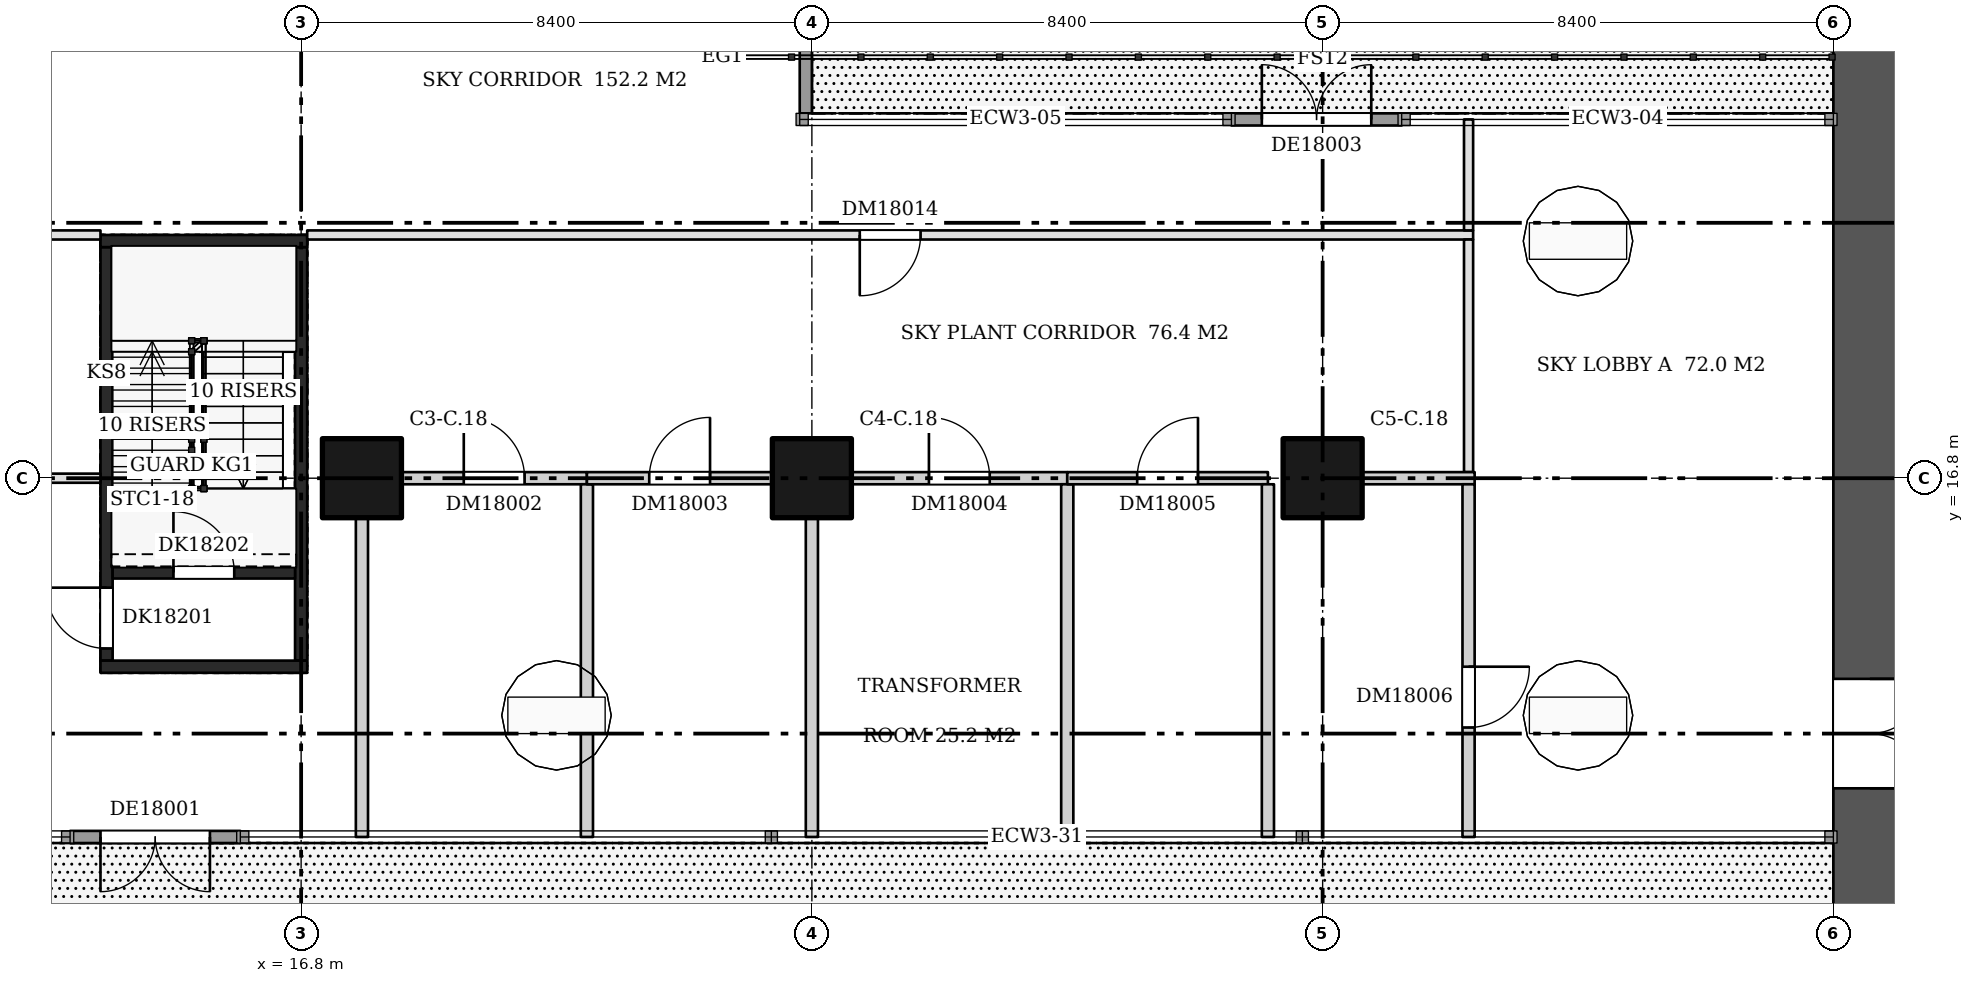
"""IFC4 building model, lengths in metres.
Left out: names, types, materials, properties, quantities, classifications, styles, units other than length and angle.
Written with IfcOpenShell. Run it as: python <this file> out.ifc"""

import sys

from ifc_helpers import new_model, si_unit, direction, frame, frame_2d, origin, origin_2d, place, context, subcontext, project, spatial, rectangle, extrude, element, fill, save


model = new_model("IFC4")
c1 = context("Model", 3, precision=1e-05, world=origin(), true_north=direction((0.0, 1.0)))
c2 = subcontext(c1, "Body", "Model", "MODEL_VIEW")
j1 = project(units=[si_unit("LENGTHUNIT", "METRE"), si_unit("PLANEANGLEUNIT", "RADIAN")], contexts=[c1])
p1 = place(None, origin())
s1 = spatial("IfcSite", under=j1, at=p1, CompositionType="ELEMENT")
p2 = place(p1, origin())
s2 = spatial("IfcBuilding", under=s1, at=p2, CompositionType="ELEMENT")
p3 = place(p2, frame((0.0, 0.0, 74.2)))
s3 = spatial("IfcBuildingStorey", under=s2, at=p3, CompositionType="ELEMENT", Elevation=74.2)
for number, where, z_axis, x_axis in (
    (1, (17.8, 16.8, 0.0), (0.0, 0.0, 1.0), (1.0, 0.0, 0.0)),
    (2, (25.2, 16.8, 0.0), (0.0, 0.0, 1.0), (1.0, 0.0, 0.0)),
    (3, (33.6, 16.8, 0.0), (0.0, 0.0, 1.0), (1.0, 0.0, 0.0)),
):
    element("IfcColumn", number, at=place(p3, frame(where, z_axis=z_axis, x_axis=x_axis)), inside=s3, PredefinedType="COLUMN", context=c2, shape_type="SweptSolid", body=[
        extrude(rectangle(XDim=1.3, YDim=1.3, at=origin_2d()), origin(), (0.0, 0.0, 1.0), 6.72),
    ])
p4 = place(p3, frame((42.6, 9.6, 0.0), z_axis=(0.0, 0.0, 1.0), x_axis=(0.0, 1.0, 0.0)))
e4 = element("IfcWall", 4, at=p4, inside=s3, PredefinedType="SHEAR", context=c2, shape_type="SweptSolid", body=[
    extrude(rectangle(XDim=14.4, YDim=1.2, at=frame_2d((7.2, 0.0))), origin(), (0.0, 0.0, 1.0), 6.72),
])
p5 = place(p4, frame((2.1, 0.0, 0.0)))
e5 = element("IfcOpeningElement", 5, at=p5, cuts=e4, PredefinedType="OPENING", context=c2, shape_type="SweptSolid", body=[
    extrude(rectangle(XDim=1.8, YDim=2.1, at=frame_2d((0.9, 1.05))), frame((0.0, 0.61, 0.0), z_axis=(0.0, -1.0, 0.0), x_axis=(1.0, 0.0, 0.0)), (0.0, 0.0, 1.0), 1.22),
])
p6 = place(p3, frame((13.6, 13.8, 0.0), z_axis=(0.0, 0.0, 1.0), x_axis=(0.0, 1.0, 0.0)))
e6 = element("IfcWall", 6, at=p6, inside=s3, PredefinedType="SHEAR", context=c2, shape_type="SweptSolid", body=[
    extrude(rectangle(XDim=6.8, YDim=0.2, at=frame_2d((3.4, 0.0))), origin(), (0.0, 0.0, 1.0), 6.72),
])
p7 = place(p6, frame((0.2, 0.0, 0.0)))
e7 = element("IfcOpeningElement", 7, at=p7, cuts=e6, PredefinedType="OPENING", context=c2, shape_type="SweptSolid", body=[
    extrude(rectangle(XDim=1.0, YDim=2.1, at=frame_2d((0.5, 1.05))), frame((0.0, 0.11, 0.0), z_axis=(0.0, -1.0, 0.0), x_axis=(1.0, 0.0, 0.0)), (0.0, 0.0, 1.0), 0.22),
])
p8 = place(p3, frame((16.8, 13.8, 0.0), z_axis=(0.0, 0.0, 1.0), x_axis=(0.0, 1.0, 0.0)))
e8 = element("IfcWall", 8, at=p8, inside=s3, PredefinedType="SHEAR", context=c2, shape_type="SweptSolid", body=[
    extrude(rectangle(XDim=6.8, YDim=0.2, at=frame_2d((3.4, 0.0))), origin(), (0.0, 0.0, 1.0), 6.72),
])
for number, where, z_axis, x_axis in (
    (9, (13.5, 13.7, 0.0), (0.0, 0.0, 1.0), (1.0, 0.0, 0.0)),
    (10, (13.5, 20.7, 0.0), (0.0, 0.0, 1.0), (1.0, 0.0, 0.0)),
):
    element("IfcWall", number, at=place(p3, frame(where, z_axis=z_axis, x_axis=x_axis)), inside=s3, PredefinedType="SHEAR", context=c2, shape_type="SweptSolid", body=[
        extrude(rectangle(XDim=3.4, YDim=0.2, at=frame_2d((1.7, 0.0))), origin(), (0.0, 0.0, 1.0), 6.72),
    ])
p9 = place(p3, frame((13.7, 15.25, 0.0), z_axis=(0.0, 0.0, 1.0), x_axis=(1.0, 0.0, 0.0)))
e11 = element("IfcWall", 11, at=p9, inside=s3, PredefinedType="SHEAR", context=c2, shape_type="SweptSolid", body=[
    extrude(rectangle(XDim=3.0, YDim=0.2, at=frame_2d((1.5, 0.0))), origin(), (0.0, 0.0, 1.0), 6.72),
])
p10 = place(p9, frame((1.0, 0.0, 0.0)))
e12 = element("IfcOpeningElement", 12, at=p10, cuts=e11, PredefinedType="OPENING", context=c2, shape_type="SweptSolid", body=[
    extrude(rectangle(XDim=1.0, YDim=2.1, at=frame_2d((0.5, 1.05))), frame((0.0, 0.11, 0.0), z_axis=(0.0, -1.0, 0.0), x_axis=(1.0, 0.0, 0.0)), (0.0, 0.0, 1.0), 0.22),
])
p11 = place(p3, frame((9.05, 16.8, 0.0), z_axis=(0.0, 0.0, 1.0), x_axis=(1.0, 0.0, 0.0)))
e13 = element("IfcWall", 13, at=p11, inside=s3, PredefinedType="PARTITIONING", context=c2, shape_type="SweptSolid", body=[
    extrude(rectangle(XDim=4.45, YDim=0.15, at=frame_2d((2.225, 0.0))), origin(), (0.0, 0.0, 1.0), 6.72),
])
p12 = place(p3, frame((2.5, 20.8, 0.0), z_axis=(0.0, 0.0, 1.0), x_axis=(1.0, 0.0, 0.0)))
e14 = element("IfcWall", 14, at=p12, inside=s3, PredefinedType="PARTITIONING", context=c2, shape_type="SweptSolid", body=[
    extrude(rectangle(XDim=11.0, YDim=0.15, at=frame_2d((5.5, 0.0))), origin(), (0.0, 0.0, 1.0), 6.72),
])
p13 = place(p12, frame((5.0, 0.0, 0.0)))
e15 = element("IfcOpeningElement", 15, at=p13, cuts=e14, PredefinedType="OPENING", context=c2, shape_type="SweptSolid", body=[
    extrude(rectangle(XDim=1.0, YDim=2.1, at=frame_2d((0.5, 1.05))), frame((0.0, 0.085, 0.0), z_axis=(0.0, -1.0, 0.0), x_axis=(1.0, 0.0, 0.0)), (0.0, 0.0, 1.0), 0.17),
])
p14 = place(p3, frame((16.9, 20.8, 0.0), z_axis=(0.0, 0.0, 1.0), x_axis=(1.0, 0.0, 0.0)))
e16 = element("IfcWall", 16, at=p14, inside=s3, PredefinedType="PARTITIONING", context=c2, shape_type="SweptSolid", body=[
    extrude(rectangle(XDim=19.175, YDim=0.15, at=frame_2d((9.587, 0.0))), origin(), (0.0, 0.0, 1.0), 6.72),
])
p15 = place(p14, frame((9.087, 0.0, 0.0)))
e17 = element("IfcOpeningElement", 17, at=p15, cuts=e16, PredefinedType="OPENING", context=c2, shape_type="SweptSolid", body=[
    extrude(rectangle(XDim=1.0, YDim=2.1, at=frame_2d((0.5, 1.05))), frame((0.0, 0.085, 0.0), z_axis=(0.0, -1.0, 0.0), x_axis=(1.0, 0.0, 0.0)), (0.0, 0.0, 1.0), 0.17),
])
p16 = place(p3, frame((17.8, 10.9, 0.0), z_axis=(0.0, 0.0, 1.0), x_axis=(0.0, 1.0, 0.0)))
e18 = element("IfcWall", 18, at=p16, inside=s3, PredefinedType="PARTITIONING", context=c2, shape_type="SweptSolid", body=[
    extrude(rectangle(XDim=5.25, YDim=0.2, at=frame_2d((2.625, 0.0))), origin(), (0.0, 0.0, 1.0), 6.72),
])
p17 = place(p3, frame((18.45, 16.8, 0.0), z_axis=(0.0, 0.0, 1.0), x_axis=(1.0, 0.0, 0.0)))
e19 = element("IfcWall", 19, at=p17, inside=s3, PredefinedType="PARTITIONING", context=c2, shape_type="SweptSolid", body=[
    extrude(rectangle(XDim=3.05, YDim=0.2, at=frame_2d((1.525, 0.0))), origin(), (0.0, 0.0, 1.0), 6.72),
])
p18 = place(p17, frame((1.025, 0.0, 0.0)))
e20 = element("IfcOpeningElement", 20, at=p18, cuts=e19, PredefinedType="OPENING", context=c2, shape_type="SweptSolid", body=[
    extrude(rectangle(XDim=1.0, YDim=2.1, at=frame_2d((0.5, 1.05))), frame((0.0, 0.11, 0.0), z_axis=(0.0, -1.0, 0.0), x_axis=(1.0, 0.0, 0.0)), (0.0, 0.0, 1.0), 0.22),
])
p19 = place(p3, frame((21.5, 10.9, 0.0), z_axis=(0.0, 0.0, 1.0), x_axis=(0.0, 1.0, 0.0)))
e21 = element("IfcWall", 21, at=p19, inside=s3, PredefinedType="PARTITIONING", context=c2, shape_type="SweptSolid", body=[
    extrude(rectangle(XDim=5.8, YDim=0.2, at=frame_2d((2.9, 0.0))), origin(), (0.0, 0.0, 1.0), 6.72),
])
p20 = place(p3, frame((21.5, 16.8, 0.0), z_axis=(0.0, 0.0, 1.0), x_axis=(1.0, 0.0, 0.0)))
e22 = element("IfcWall", 22, at=p20, inside=s3, PredefinedType="PARTITIONING", context=c2, shape_type="SweptSolid", body=[
    extrude(rectangle(XDim=3.05, YDim=0.2, at=frame_2d((1.525, 0.0))), origin(), (0.0, 0.0, 1.0), 6.72),
])
p21 = place(p20, frame((1.025, 0.0, 0.0)))
e23 = element("IfcOpeningElement", 23, at=p21, cuts=e22, PredefinedType="OPENING", context=c2, shape_type="SweptSolid", body=[
    extrude(rectangle(XDim=1.0, YDim=2.1, at=frame_2d((0.5, 1.05))), frame((0.0, 0.11, 0.0), z_axis=(0.0, -1.0, 0.0), x_axis=(1.0, 0.0, 0.0)), (0.0, 0.0, 1.0), 0.22),
])
p22 = place(p3, frame((25.2, 10.9, 0.0), z_axis=(0.0, 0.0, 1.0), x_axis=(0.0, 1.0, 0.0)))
e24 = element("IfcWall", 24, at=p22, inside=s3, PredefinedType="PARTITIONING", context=c2, shape_type="SweptSolid", body=[
    extrude(rectangle(XDim=5.25, YDim=0.2, at=frame_2d((2.625, 0.0))), origin(), (0.0, 0.0, 1.0), 6.72),
])
p23 = place(p3, frame((25.85, 16.8, 0.0), z_axis=(0.0, 0.0, 1.0), x_axis=(1.0, 0.0, 0.0)))
e25 = element("IfcWall", 25, at=p23, inside=s3, PredefinedType="PARTITIONING", context=c2, shape_type="SweptSolid", body=[
    extrude(rectangle(XDim=3.55, YDim=0.2, at=frame_2d((1.775, 0.0))), origin(), (0.0, 0.0, 1.0), 6.72),
])
p24 = place(p23, frame((1.275, 0.0, 0.0)))
e26 = element("IfcOpeningElement", 26, at=p24, cuts=e25, PredefinedType="OPENING", context=c2, shape_type="SweptSolid", body=[
    extrude(rectangle(XDim=1.0, YDim=2.1, at=frame_2d((0.5, 1.05))), frame((0.0, 0.11, 0.0), z_axis=(0.0, -1.0, 0.0), x_axis=(1.0, 0.0, 0.0)), (0.0, 0.0, 1.0), 0.22),
])
p25 = place(p3, frame((29.4, 10.9, 0.0), z_axis=(0.0, 0.0, 1.0), x_axis=(0.0, 1.0, 0.0)))
e27 = element("IfcWall", 27, at=p25, inside=s3, PredefinedType="PARTITIONING", context=c2, shape_type="SweptSolid", body=[
    extrude(rectangle(XDim=5.8, YDim=0.2, at=frame_2d((2.9, 0.0))), origin(), (0.0, 0.0, 1.0), 6.72),
])
p26 = place(p3, frame((29.4, 16.8, 0.0), z_axis=(0.0, 0.0, 1.0), x_axis=(1.0, 0.0, 0.0)))
e28 = element("IfcWall", 28, at=p26, inside=s3, PredefinedType="PARTITIONING", context=c2, shape_type="SweptSolid", body=[
    extrude(rectangle(XDim=3.3, YDim=0.2, at=frame_2d((1.65, 0.0))), origin(), (0.0, 0.0, 1.0), 6.72),
])
p27 = place(p26, frame((1.15, 0.0, 0.0)))
e29 = element("IfcOpeningElement", 29, at=p27, cuts=e28, PredefinedType="OPENING", context=c2, shape_type="SweptSolid", body=[
    extrude(rectangle(XDim=1.0, YDim=2.1, at=frame_2d((0.5, 1.05))), frame((0.0, 0.11, 0.0), z_axis=(0.0, -1.0, 0.0), x_axis=(1.0, 0.0, 0.0)), (0.0, 0.0, 1.0), 0.22),
])
p28 = place(p3, frame((32.7, 10.9, 0.0), z_axis=(0.0, 0.0, 1.0), x_axis=(0.0, 1.0, 0.0)))
e30 = element("IfcWall", 30, at=p28, inside=s3, PredefinedType="PARTITIONING", context=c2, shape_type="SweptSolid", body=[
    extrude(rectangle(XDim=5.8, YDim=0.2, at=frame_2d((2.9, 0.0))), origin(), (0.0, 0.0, 1.0), 6.72),
])
p29 = place(p3, frame((34.25, 16.8, 0.0), z_axis=(0.0, 0.0, 1.0), x_axis=(1.0, 0.0, 0.0)))
e31 = element("IfcWall", 31, at=p29, inside=s3, PredefinedType="PARTITIONING", context=c2, shape_type="SweptSolid", body=[
    extrude(rectangle(XDim=1.85, YDim=0.2, at=frame_2d((0.925, 0.0))), origin(), (0.0, 0.0, 1.0), 6.72),
])
p30 = place(p3, frame((36.0, 10.9, 0.0), z_axis=(0.0, 0.0, 1.0), x_axis=(0.0, 1.0, 0.0)))
e32 = element("IfcWall", 32, at=p30, inside=s3, PredefinedType="PARTITIONING", context=c2, shape_type="SweptSolid", body=[
    extrude(rectangle(XDim=5.8, YDim=0.2, at=frame_2d((2.9, 0.0))), origin(), (0.0, 0.0, 1.0), 6.72),
])
p31 = place(p30, frame((1.8, 0.0, 0.0)))
e33 = element("IfcOpeningElement", 33, at=p31, cuts=e32, PredefinedType="OPENING", context=c2, shape_type="SweptSolid", body=[
    extrude(rectangle(XDim=1.0, YDim=2.1, at=frame_2d((0.5, 1.05))), frame((0.0, 0.11, 0.0), z_axis=(0.0, -1.0, 0.0), x_axis=(1.0, 0.0, 0.0)), (0.0, 0.0, 1.0), 0.22),
])
p32 = place(p3, frame((36.0, 16.9, 0.0), z_axis=(0.0, 0.0, 1.0), x_axis=(0.0, 1.0, 0.0)))
e34 = element("IfcWall", 34, at=p32, inside=s3, PredefinedType="PARTITIONING", context=c2, shape_type="SweptSolid", body=[
    extrude(rectangle(XDim=3.825, YDim=0.15, at=frame_2d((1.913, 0.0))), origin(), (0.0, 0.0, 1.0), 6.72),
])
p33 = place(p3, frame((36.0, 20.875, 0.0), z_axis=(0.0, 0.0, 1.0), x_axis=(0.0, 1.0, 0.0)))
e35 = element("IfcWall", 35, at=p33, inside=s3, PredefinedType="PARTITIONING", context=c2, shape_type="SweptSolid", body=[
    extrude(rectangle(XDim=1.825, YDim=0.15, at=frame_2d((0.913, 0.0))), origin(), (0.0, 0.0, 1.0), 6.72),
])
p34 = place(p3, frame((13.0, 10.9, 0.0), z_axis=(0.0, 0.0, 1.0), x_axis=(1.0, 0.0, 0.0)))
e36 = element("IfcWall", 36, at=p34, inside=s3, PredefinedType="SOLIDWALL", context=c2, shape_type="SweptSolid", body=[
    extrude(rectangle(XDim=2.8, YDim=0.2, at=frame_2d((1.4, 0.0))), origin(), (0.0, 0.0, 1.0), 6.72),
])
p35 = place(p34, frame((0.5, 0.0, 0.0)))
e37 = element("IfcOpeningElement", 37, at=p35, cuts=e36, PredefinedType="OPENING", context=c2, shape_type="SweptSolid", body=[
    extrude(rectangle(XDim=1.8, YDim=2.4, at=frame_2d((0.9, 1.2))), frame((0.0, 0.11, 0.0), z_axis=(0.0, -1.0, 0.0), x_axis=(1.0, 0.0, 0.0)), (0.0, 0.0, 1.0), 0.22),
])
p36 = place(p3, frame((34.9, 22.7, 0.0), z_axis=(0.0, 0.0, 1.0), x_axis=(-1.0, 0.0, 0.0)))
e38 = element("IfcWall", 38, at=p36, inside=s3, PredefinedType="SOLIDWALL", context=c2, shape_type="SweptSolid", body=[
    extrude(rectangle(XDim=2.8, YDim=0.2, at=frame_2d((1.4, 0.0))), origin(), (0.0, 0.0, 1.0), 6.72),
])
p37 = place(p36, frame((0.5, 0.0, 0.0)))
e39 = element("IfcOpeningElement", 39, at=p37, cuts=e38, PredefinedType="OPENING", context=c2, shape_type="SweptSolid", body=[
    extrude(rectangle(XDim=1.8, YDim=2.4, at=frame_2d((0.9, 1.2))), frame((0.0, 0.11, 0.0), z_axis=(0.0, -1.0, 0.0), x_axis=(1.0, 0.0, 0.0)), (0.0, 0.0, 1.0), 0.22),
])
p38 = place(p3, frame((25.1, 22.8, 0.0), z_axis=(0.0, 0.0, 1.0), x_axis=(0.0, 1.0, 0.0)))
e40 = element("IfcWall", 40, at=p38, inside=s3, PredefinedType="SOLIDWALL", context=c2, shape_type="SweptSolid", body=[
    extrude(rectangle(XDim=1.7, YDim=0.2, at=frame_2d((0.85, 0.0))), origin(), (0.0, 0.0, 1.0), 6.72),
])
p39 = place(p5, frame((1.8, 0.0, 0.0), z_axis=(0.0, 0.0, 1.0), x_axis=(-1.0, 0.0, 0.0)))
e41 = element("IfcDoor", 41, at=p39, inside=s3, OperationType="DOUBLE_DOOR_SINGLE_SWING", PredefinedType="DOOR", context=c2, shape_type="SweptSolid", body=[
    extrude(rectangle(XDim=1.8, YDim=2.1, at=frame_2d((0.9, 1.05))), frame((0.0, 0.025, 0.0), z_axis=(0.0, -1.0, 0.0), x_axis=(1.0, 0.0, 0.0)), (0.0, 0.0, 1.0), 0.05),
])
fill(e5, e41)
p40 = place(p7, origin())
e42 = element("IfcDoor", 42, at=p40, inside=s3, OperationType="SINGLE_SWING_RIGHT", PredefinedType="DOOR", context=c2, shape_type="SweptSolid", body=[
    extrude(rectangle(XDim=1.0, YDim=2.1, at=frame_2d((0.5, 1.05))), frame((0.0, 0.025, 0.0), z_axis=(0.0, -1.0, 0.0), x_axis=(1.0, 0.0, 0.0)), (0.0, 0.0, 1.0), 0.05),
])
fill(e7, e42)
p41 = place(p10, origin())
e43 = element("IfcDoor", 43, at=p41, inside=s3, OperationType="SINGLE_SWING_LEFT", PredefinedType="DOOR", context=c2, shape_type="SweptSolid", body=[
    extrude(rectangle(XDim=1.0, YDim=2.1, at=frame_2d((0.5, 1.05))), frame((0.0, 0.025, 0.0), z_axis=(0.0, -1.0, 0.0), x_axis=(1.0, 0.0, 0.0)), (0.0, 0.0, 1.0), 0.05),
])
fill(e12, e43)
p42 = place(p18, origin())
e44 = element("IfcDoor", 44, at=p42, inside=s3, OperationType="SINGLE_SWING_LEFT", PredefinedType="DOOR", context=c2, shape_type="SweptSolid", body=[
    extrude(rectangle(XDim=1.0, YDim=2.1, at=frame_2d((0.5, 1.05))), frame((0.0, 0.025, 0.0), z_axis=(0.0, -1.0, 0.0), x_axis=(1.0, 0.0, 0.0)), (0.0, 0.0, 1.0), 0.05),
])
fill(e20, e44)
p43 = place(p21, origin())
e45 = element("IfcDoor", 45, at=p43, inside=s3, OperationType="SINGLE_SWING_RIGHT", PredefinedType="DOOR", context=c2, shape_type="SweptSolid", body=[
    extrude(rectangle(XDim=1.0, YDim=2.1, at=frame_2d((0.5, 1.05))), frame((0.0, 0.025, 0.0), z_axis=(0.0, -1.0, 0.0), x_axis=(1.0, 0.0, 0.0)), (0.0, 0.0, 1.0), 0.05),
])
fill(e23, e45)
p44 = place(p24, origin())
e46 = element("IfcDoor", 46, at=p44, inside=s3, OperationType="SINGLE_SWING_LEFT", PredefinedType="DOOR", context=c2, shape_type="SweptSolid", body=[
    extrude(rectangle(XDim=1.0, YDim=2.1, at=frame_2d((0.5, 1.05))), frame((0.0, 0.025, 0.0), z_axis=(0.0, -1.0, 0.0), x_axis=(1.0, 0.0, 0.0)), (0.0, 0.0, 1.0), 0.05),
])
fill(e26, e46)
p45 = place(p27, origin())
e47 = element("IfcDoor", 47, at=p45, inside=s3, OperationType="SINGLE_SWING_RIGHT", PredefinedType="DOOR", context=c2, shape_type="SweptSolid", body=[
    extrude(rectangle(XDim=1.0, YDim=2.1, at=frame_2d((0.5, 1.05))), frame((0.0, 0.025, 0.0), z_axis=(0.0, -1.0, 0.0), x_axis=(1.0, 0.0, 0.0)), (0.0, 0.0, 1.0), 0.05),
])
fill(e29, e47)
p46 = place(p31, frame((1.0, 0.0, 0.0), z_axis=(0.0, 0.0, 1.0), x_axis=(-1.0, 0.0, 0.0)))
e48 = element("IfcDoor", 48, at=p46, inside=s3, OperationType="SINGLE_SWING_LEFT", PredefinedType="DOOR", context=c2, shape_type="SweptSolid", body=[
    extrude(rectangle(XDim=1.0, YDim=2.1, at=frame_2d((0.5, 1.05))), frame((0.0, 0.025, 0.0), z_axis=(0.0, -1.0, 0.0), x_axis=(1.0, 0.0, 0.0)), (0.0, 0.0, 1.0), 0.05),
])
fill(e33, e48)
p47 = place(p15, frame((1.0, 0.0, 0.0), z_axis=(0.0, 0.0, 1.0), x_axis=(-1.0, 0.0, 0.0)))
e49 = element("IfcDoor", 49, at=p47, inside=s3, OperationType="SINGLE_SWING_RIGHT", PredefinedType="DOOR", context=c2, shape_type="SweptSolid", body=[
    extrude(rectangle(XDim=1.0, YDim=2.1, at=frame_2d((0.5, 1.05))), frame((0.0, 0.025, 0.0), z_axis=(0.0, -1.0, 0.0), x_axis=(1.0, 0.0, 0.0)), (0.0, 0.0, 1.0), 0.05),
])
fill(e17, e49)
p48 = place(p35, frame((1.8, 0.0, 0.0), z_axis=(0.0, 0.0, 1.0), x_axis=(-1.0, 0.0, 0.0)))
e50 = element("IfcDoor", 50, at=p48, inside=s3, OperationType="DOUBLE_DOOR_SINGLE_SWING", PredefinedType="DOOR", context=c2, shape_type="SweptSolid", body=[
    extrude(rectangle(XDim=1.8, YDim=2.4, at=frame_2d((0.9, 1.2))), frame((0.0, 0.025, 0.0), z_axis=(0.0, -1.0, 0.0), x_axis=(1.0, 0.0, 0.0)), (0.0, 0.0, 1.0), 0.05),
])
fill(e37, e50)
p49 = place(p37, frame((1.8, 0.0, 0.0), z_axis=(0.0, 0.0, 1.0), x_axis=(-1.0, 0.0, 0.0)))
e51 = element("IfcDoor", 51, at=p49, inside=s3, OperationType="DOUBLE_DOOR_SINGLE_SWING", PredefinedType="DOOR", context=c2, shape_type="SweptSolid", body=[
    extrude(rectangle(XDim=1.8, YDim=2.4, at=frame_2d((0.9, 1.2))), frame((0.0, 0.025, 0.0), z_axis=(0.0, -1.0, 0.0), x_axis=(1.0, 0.0, 0.0)), (0.0, 0.0, 1.0), 0.05),
])
fill(e39, e51)
save(model, sys.argv[1])
